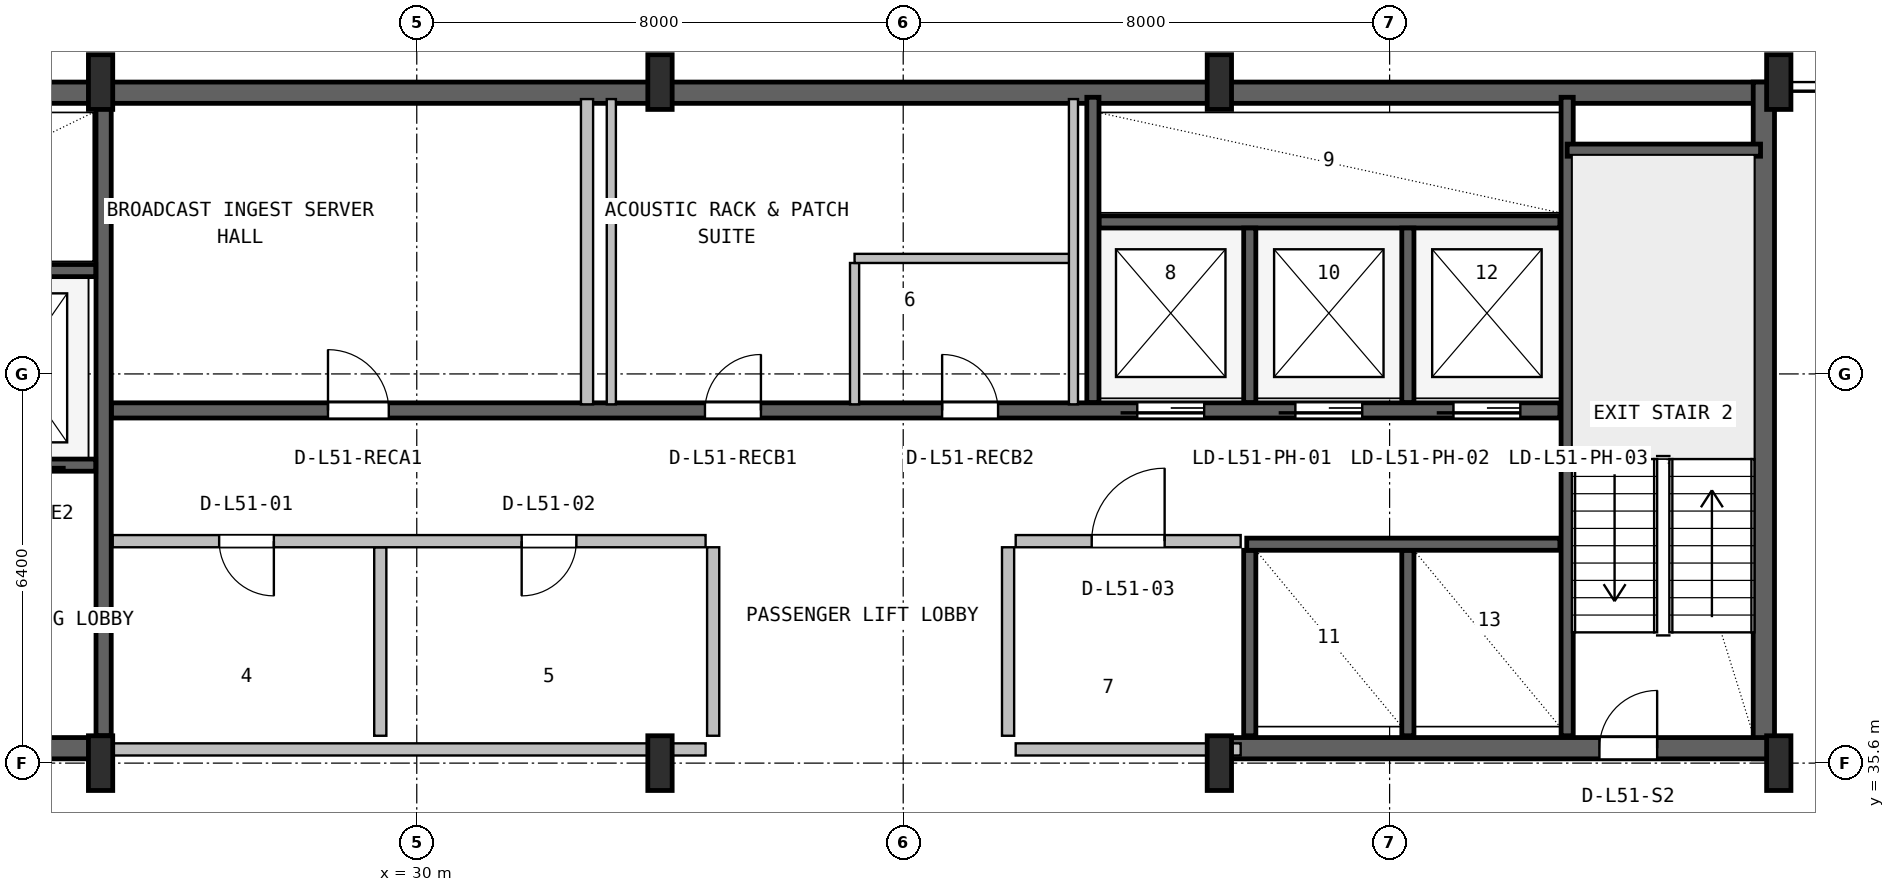
"""IFC4 building model, lengths in metres.
Left out: names, types, materials, properties, quantities, classifications, styles, units other than length and angle.
Written with IfcOpenShell. Run it as: python <this file> out.ifc"""

import sys

from ifc_helpers import new_model, si_unit, direction, frame, frame_2d, origin, origin_2d, place, context, subcontext, project, spatial, rectangle, i_section, extrude, source, transform, mapped, element, fill, save


model = new_model("IFC4")
c1 = context("Model", 3, precision=1e-05, world=origin(), true_north=direction((0.0, 1.0)))
c2 = subcontext(c1, "Body", "Model", "MODEL_VIEW")
j1 = project(units=[si_unit("LENGTHUNIT", "METRE"), si_unit("PLANEANGLEUNIT", "RADIAN")], contexts=[c1])
p1 = place(None, origin())
s1 = spatial("IfcSite", under=j1, at=p1, CompositionType="ELEMENT")
p2 = place(p1, origin())
s2 = spatial("IfcBuilding", under=s1, at=p2, CompositionType="ELEMENT")
p3 = place(p2, frame((0.0, 0.0, 207.4)))
s3 = spatial("IfcBuildingStorey", under=s2, at=p3, CompositionType="ELEMENT", Elevation=207.4)
p4 = place(p3, frame((15.6, 46.625, 0.0), z_axis=(0.0, 0.0, 1.0), x_axis=(1.0, 0.0, 0.0)))
e1 = element("IfcWall", 1, at=p4, inside=s3, PredefinedType="SHEAR", context=c2, shape_type="SweptSolid", body=[
    extrude(rectangle(XDim=36.8, YDim=0.35, at=frame_2d((18.4, 0.0))), origin(), (0.0, 0.0, 1.0), 3.55),
])
p5 = place(p3, frame((52.155, 35.67, 0.0), z_axis=(0.0, 0.0, 1.0), x_axis=(0.0, 1.0, 0.0)))
e2 = element("IfcWall", 2, at=p5, inside=s3, PredefinedType="SHEAR", context=c2, shape_type="SweptSolid", body=[
    extrude(rectangle(XDim=11.13, YDim=0.35, at=frame_2d((5.565, 0.0))), origin(), (0.0, 0.0, 1.0), 3.55),
])
p6 = place(p3, frame((15.67, 35.845, 0.0), z_axis=(0.0, 0.0, 1.0), x_axis=(1.0, 0.0, 0.0)))
e3 = element("IfcWall", 3, at=p6, inside=s3, PredefinedType="SHEAR", context=c2, shape_type="SweptSolid", body=[
    extrude(rectangle(XDim=9.13, YDim=0.35, at=frame_2d((4.565, 0.0))), origin(), (0.0, 0.0, 1.0), 3.55),
])
p7 = place(p6, frame((5.4, 0.0, 0.0)))
e4 = element("IfcOpeningElement", 4, at=p7, cuts=e3, PredefinedType="OPENING", context=c2, shape_type="SweptSolid", body=[
    extrude(rectangle(XDim=1.0, YDim=2.1, at=frame_2d((0.5, 1.05))), frame((0.0, 0.185, 0.0), z_axis=(0.0, -1.0, 0.0), x_axis=(1.0, 0.0, 0.0)), (0.0, 0.0, 1.0), 0.37),
])
p8 = place(p3, frame((43.2, 35.845, 0.0), z_axis=(0.0, 0.0, 1.0), x_axis=(1.0, 0.0, 0.0)))
e5 = element("IfcWall", 5, at=p8, inside=s3, PredefinedType="SHEAR", context=c2, shape_type="SweptSolid", body=[
    extrude(rectangle(XDim=9.13, YDim=0.35, at=frame_2d((4.565, 0.0))), origin(), (0.0, 0.0, 1.0), 3.55),
])
p9 = place(p8, frame((6.25, 0.0, 0.0)))
e6 = element("IfcOpeningElement", 6, at=p9, cuts=e5, PredefinedType="OPENING", context=c2, shape_type="SweptSolid", body=[
    extrude(rectangle(XDim=0.95, YDim=2.1, at=frame_2d((0.475, 1.05))), frame((0.0, 0.185, 0.0), z_axis=(0.0, -1.0, 0.0), x_axis=(1.0, 0.0, 0.0)), (0.0, 0.0, 1.0), 0.37),
])
m1 = source(origin(), c2, "Body", "SweptSolid", [
    extrude(i_section(OverallWidth=0.4, OverallDepth=0.9, WebThickness=0.016, FlangeThickness=0.028, FilletRadius=0.016, at=origin_2d()), origin(), (0.0, 0.0, 1.0), 3.8),
])
for number, where, z_axis, x_axis in (
    (7, (24.8, 35.6, 0.0), (0.0, 0.0, 1.0), (1.0, 0.0, 0.0)),
    (8, (24.8, 46.8, 0.0), (0.0, 0.0, 1.0), (1.0, 0.0, 0.0)),
    (9, (34.0, 35.6, 0.0), (0.0, 0.0, 1.0), (1.0, 0.0, 0.0)),
    (10, (34.0, 46.8, 0.0), (0.0, 0.0, 1.0), (1.0, 0.0, 0.0)),
    (11, (43.2, 35.6, 0.0), (0.0, 0.0, 1.0), (1.0, 0.0, 0.0)),
    (12, (43.2, 46.8, 0.0), (0.0, 0.0, 1.0), (1.0, 0.0, 0.0)),
    (13, (52.4, 35.6, 0.0), (0.0, 0.0, 1.0), (1.0, 0.0, 0.0)),
    (14, (52.4, 46.8, 0.0), (0.0, 0.0, 1.0), (1.0, 0.0, 0.0)),
):
    element("IfcColumn", number, at=place(p3, frame(where, z_axis=z_axis, x_axis=x_axis)), inside=s3, PredefinedType="COLUMN", context=c2, shape_type="MappedRepresentation", body=[
        mapped(m1, transform((0.0, 0.0, 0.0), x_axis=(1.0, 0.0, 0.0), y_axis=(0.0, 1.0, 0.0), z_axis=(0.0, 0.0, 1.0), scale=1.0)),
    ])
p10 = place(p3, frame((24.85, 36.05, 0.0), z_axis=(0.0, 0.0, 1.0), x_axis=(0.0, 1.0, 0.0)))
e15 = element("IfcWall", 15, at=p10, inside=s3, PredefinedType="SHEAR", context=c2, shape_type="SweptSolid", body=[
    extrude(rectangle(XDim=10.45, YDim=0.25, at=frame_2d((5.225, 0.0))), origin(), (0.0, 0.0, 1.0), 3.55),
])
p11 = place(p3, frame((19.2, 40.5, 0.0), z_axis=(0.0, 0.0, 1.0), x_axis=(1.0, 0.0, 0.0)))
e16 = element("IfcWall", 16, at=p11, inside=s3, PredefinedType="SHEAR", context=c2, shape_type="SweptSolid", body=[
    extrude(rectangle(XDim=5.52, YDim=0.2, at=frame_2d((2.76, 0.0))), origin(), (0.0, 0.0, 1.0), 3.55),
])
p12 = place(p11, frame((1.05, 0.0, 0.0)))
e17 = element("IfcOpeningElement", 17, at=p12, cuts=e16, PredefinedType="OPENING", context=c2, shape_type="SweptSolid", body=[
    extrude(rectangle(XDim=1.1, YDim=2.18, at=frame_2d((0.55, 1.09))), frame((0.0, 0.11, 0.0), z_axis=(0.0, -1.0, 0.0), x_axis=(1.0, 0.0, 0.0)), (0.0, 0.0, 1.0), 0.22),
])
p13 = place(p11, frame((3.65, 0.0, 0.0)))
e18 = element("IfcOpeningElement", 18, at=p13, cuts=e16, PredefinedType="OPENING", context=c2, shape_type="SweptSolid", body=[
    extrude(rectangle(XDim=1.1, YDim=2.18, at=frame_2d((0.55, 1.09))), frame((0.0, 0.11, 0.0), z_axis=(0.0, -1.0, 0.0), x_axis=(1.0, 0.0, 0.0)), (0.0, 0.0, 1.0), 0.22),
])
p14 = place(p3, frame((19.2, 43.7, 0.0), z_axis=(0.0, 0.0, 1.0), x_axis=(1.0, 0.0, 0.0)))
e19 = element("IfcWall", 19, at=p14, inside=s3, PredefinedType="SHEAR", context=c2, shape_type="SweptSolid", body=[
    extrude(rectangle(XDim=5.52, YDim=0.2, at=frame_2d((2.76, 0.0))), origin(), (0.0, 0.0, 1.0), 3.55),
])
p15 = place(p3, frame((48.92, 36.05, 0.0), z_axis=(0.0, 0.0, 1.0), x_axis=(0.0, 1.0, 0.0)))
e20 = element("IfcWall", 20, at=p15, inside=s3, PredefinedType="SHEAR", context=c2, shape_type="SweptSolid", body=[
    extrude(rectangle(XDim=10.5, YDim=0.2, at=frame_2d((5.25, 0.0))), origin(), (0.0, 0.0, 1.0), 3.55),
])
p16 = place(p3, frame((48.92, 45.68, 0.0), z_axis=(0.0, 0.0, 1.0), x_axis=(1.0, 0.0, 0.0)))
e21 = element("IfcWall", 21, at=p16, inside=s3, PredefinedType="SHEAR", context=c2, shape_type="SweptSolid", body=[
    extrude(rectangle(XDim=3.18, YDim=0.2, at=frame_2d((1.59, 0.0))), origin(), (0.0, 0.0, 1.0), 3.55),
])
p17 = place(p3, frame((24.98, 41.4, 0.0), z_axis=(0.0, 0.0, 1.0), x_axis=(1.0, 0.0, 0.0)))
e22 = element("IfcWall", 22, at=p17, inside=s3, PredefinedType="SHEAR", context=c2, shape_type="SweptSolid", body=[
    extrude(rectangle(XDim=23.82, YDim=0.25, at=frame_2d((11.91, 0.0))), origin(), (0.0, 0.0, 1.0), 3.55),
])
p18 = place(p17, frame((16.87, 0.0, 0.0)))
e23 = element("IfcOpeningElement", 23, at=p18, cuts=e22, PredefinedType="OPENING", context=c2, shape_type="SweptSolid", body=[
    extrude(rectangle(XDim=1.1, YDim=2.18, at=frame_2d((0.55, 1.09))), frame((0.0, 0.135, 0.0), z_axis=(0.0, -1.0, 0.0), x_axis=(1.0, 0.0, 0.0)), (0.0, 0.0, 1.0), 0.27),
])
p19 = place(p17, frame((19.47, 0.0, 0.0)))
e24 = element("IfcOpeningElement", 24, at=p19, cuts=e22, PredefinedType="OPENING", context=c2, shape_type="SweptSolid", body=[
    extrude(rectangle(XDim=1.1, YDim=2.18, at=frame_2d((0.55, 1.09))), frame((0.0, 0.135, 0.0), z_axis=(0.0, -1.0, 0.0), x_axis=(1.0, 0.0, 0.0)), (0.0, 0.0, 1.0), 0.27),
])
p20 = place(p17, frame((22.07, 0.0, 0.0)))
e25 = element("IfcOpeningElement", 25, at=p20, cuts=e22, PredefinedType="OPENING", context=c2, shape_type="SweptSolid", body=[
    extrude(rectangle(XDim=1.1, YDim=2.18, at=frame_2d((0.55, 1.09))), frame((0.0, 0.135, 0.0), z_axis=(0.0, -1.0, 0.0), x_axis=(1.0, 0.0, 0.0)), (0.0, 0.0, 1.0), 0.27),
])
p21 = place(p17, frame((3.56, 0.0, 0.0)))
e26 = element("IfcOpeningElement", 26, at=p21, cuts=e22, PredefinedType="OPENING", context=c2, shape_type="SweptSolid", body=[
    extrude(rectangle(XDim=1.0, YDim=2.08, at=frame_2d((0.5, 1.04))), frame((0.0, 0.135, 0.0), z_axis=(0.0, -1.0, 0.0), x_axis=(1.0, 0.0, 0.0)), (0.0, 0.0, 1.0), 0.27),
])
p22 = place(p17, frame((9.76, 0.0, 0.0)))
e27 = element("IfcOpeningElement", 27, at=p22, cuts=e22, PredefinedType="OPENING", context=c2, shape_type="SweptSolid", body=[
    extrude(rectangle(XDim=0.92, YDim=2.08, at=frame_2d((0.46, 1.04))), frame((0.0, 0.135, 0.0), z_axis=(0.0, -1.0, 0.0), x_axis=(1.0, 0.0, 0.0)), (0.0, 0.0, 1.0), 0.27),
])
p23 = place(p17, frame((13.66, 0.0, 0.0)))
e28 = element("IfcOpeningElement", 28, at=p23, cuts=e22, PredefinedType="OPENING", context=c2, shape_type="SweptSolid", body=[
    extrude(rectangle(XDim=0.92, YDim=2.08, at=frame_2d((0.46, 1.04))), frame((0.0, 0.135, 0.0), z_axis=(0.0, -1.0, 0.0), x_axis=(1.0, 0.0, 0.0)), (0.0, 0.0, 1.0), 0.27),
])
p24 = place(p3, frame((41.22, 44.5, 0.0), z_axis=(0.0, 0.0, 1.0), x_axis=(1.0, 0.0, 0.0)))
e29 = element("IfcWall", 29, at=p24, inside=s3, PredefinedType="SHEAR", context=c2, shape_type="SweptSolid", body=[
    extrude(rectangle(XDim=7.58, YDim=0.2, at=frame_2d((3.79, 0.0))), origin(), (0.0, 0.0, 1.0), 3.55),
])
p25 = place(p3, frame((41.12, 41.53, 0.0), z_axis=(0.0, 0.0, 1.0), x_axis=(0.0, 1.0, 0.0)))
e30 = element("IfcWall", 30, at=p25, inside=s3, PredefinedType="SHEAR", context=c2, shape_type="SweptSolid", body=[
    extrude(rectangle(XDim=5.02, YDim=0.2, at=frame_2d((2.51, 0.0))), origin(), (0.0, 0.0, 1.0), 3.55),
])
for number, where, z_axis, x_axis in (
    (31, (43.7, 41.53, 0.0), (0.0, 0.0, 1.0), (0.0, 1.0, 0.0)),
    (32, (46.3, 41.53, 0.0), (0.0, 0.0, 1.0), (0.0, 1.0, 0.0)),
):
    element("IfcWall", number, at=place(p3, frame(where, z_axis=z_axis, x_axis=x_axis)), inside=s3, PredefinedType="SHEAR", context=c2, shape_type="SweptSolid", body=[
        extrude(rectangle(XDim=2.87, YDim=0.2, at=frame_2d((1.435, 0.0))), origin(), (0.0, 0.0, 1.0), 3.55),
    ])
for number, where, z_axis, x_axis in (
    (33, (43.7, 36.05, 0.0), (0.0, 0.0, 1.0), (0.0, 1.0, 0.0)),
    (34, (46.3, 36.05, 0.0), (0.0, 0.0, 1.0), (0.0, 1.0, 0.0)),
):
    element("IfcWall", number, at=place(p3, frame(where, z_axis=z_axis, x_axis=x_axis)), inside=s3, PredefinedType="SHEAR", context=c2, shape_type="SweptSolid", body=[
        extrude(rectangle(XDim=3.05, YDim=0.2, at=frame_2d((1.525, 0.0))), origin(), (0.0, 0.0, 1.0), 3.55),
    ])
p26 = place(p3, frame((43.65, 39.2, 0.0), z_axis=(0.0, 0.0, 1.0), x_axis=(1.0, 0.0, 0.0)))
e35 = element("IfcWall", 35, at=p26, inside=s3, PredefinedType="SHEAR", context=c2, shape_type="SweptSolid", body=[
    extrude(rectangle(XDim=5.15, YDim=0.2, at=frame_2d((2.575, 0.0))), origin(), (0.0, 0.0, 1.0), 3.55),
])
p27 = place(p3, frame((25.0, 35.825, 0.0), z_axis=(0.0, 0.0, 1.0), x_axis=(1.0, 0.0, 0.0)))
e36 = element("IfcWall", 36, at=p27, inside=s3, PredefinedType="PLUMBINGWALL", context=c2, shape_type="SweptSolid", body=[
    extrude(rectangle(XDim=9.75, YDim=0.2, at=frame_2d((4.875, 0.0))), origin(), (0.0, 0.0, 1.0), 2.575),
])
p28 = place(p3, frame((29.4, 36.05, 0.0), z_axis=(0.0, 0.0, 1.0), x_axis=(0.0, 1.0, 0.0)))
e37 = element("IfcWall", 37, at=p28, inside=s3, PredefinedType="PLUMBINGWALL", context=c2, shape_type="SweptSolid", body=[
    extrude(rectangle(XDim=3.1, YDim=0.2, at=frame_2d((1.55, 0.0))), origin(), (0.0, 0.0, 1.0), 3.53),
])
p29 = place(p3, frame((25.0, 39.25, 0.0), z_axis=(0.0, 0.0, 1.0), x_axis=(1.0, 0.0, 0.0)))
e38 = element("IfcWall", 38, at=p29, inside=s3, PredefinedType="PLUMBINGWALL", context=c2, shape_type="SweptSolid", body=[
    extrude(rectangle(XDim=9.75, YDim=0.2, at=frame_2d((4.875, 0.0))), origin(), (0.0, 0.0, 1.0), 3.53),
])
p30 = place(p29, frame((1.75, 0.0, 0.0)))
e39 = element("IfcOpeningElement", 39, at=p30, cuts=e38, PredefinedType="OPENING", context=c2, shape_type="SweptSolid", body=[
    extrude(rectangle(XDim=0.9, YDim=2.06, at=frame_2d((0.45, 1.03))), frame((0.0, 0.11, 0.0), z_axis=(0.0, -1.0, 0.0), x_axis=(1.0, 0.0, 0.0)), (0.0, 0.0, 1.0), 0.22),
])
p31 = place(p29, frame((6.725, 0.0, 0.0)))
e40 = element("IfcOpeningElement", 40, at=p31, cuts=e38, PredefinedType="OPENING", context=c2, shape_type="SweptSolid", body=[
    extrude(rectangle(XDim=0.9, YDim=2.06, at=frame_2d((0.45, 1.03))), frame((0.0, 0.11, 0.0), z_axis=(0.0, -1.0, 0.0), x_axis=(1.0, 0.0, 0.0)), (0.0, 0.0, 1.0), 0.22),
])
p32 = place(p3, frame((34.875, 36.05, 0.0), z_axis=(0.0, 0.0, 1.0), x_axis=(0.0, 1.0, 0.0)))
e41 = element("IfcWall", 41, at=p32, inside=s3, PredefinedType="PLUMBINGWALL", context=c2, shape_type="SweptSolid", body=[
    extrude(rectangle(XDim=3.1, YDim=0.2, at=frame_2d((1.55, 0.0))), origin(), (0.0, 0.0, 1.0), 3.53),
])
p33 = place(p3, frame((39.85, 35.825, 0.0), z_axis=(0.0, 0.0, 1.0), x_axis=(1.0, 0.0, 0.0)))
e42 = element("IfcWall", 42, at=p33, inside=s3, PredefinedType="SOLIDWALL", context=c2, shape_type="SweptSolid", body=[
    extrude(rectangle(XDim=3.7, YDim=0.2, at=frame_2d((1.85, 0.0))), origin(), (0.0, 0.0, 1.0), 2.575),
])
p34 = place(p3, frame((39.85, 39.25, 0.0), z_axis=(0.0, 0.0, 1.0), x_axis=(1.0, 0.0, 0.0)))
e43 = element("IfcWall", 43, at=p34, inside=s3, PredefinedType="SOLIDWALL", context=c2, shape_type="SweptSolid", body=[
    extrude(rectangle(XDim=3.7, YDim=0.2, at=frame_2d((1.85, 0.0))), origin(), (0.0, 0.0, 1.0), 3.53),
])
p35 = place(p34, frame((1.25, 0.0, 0.0)))
e44 = element("IfcOpeningElement", 44, at=p35, cuts=e43, PredefinedType="OPENING", context=c2, shape_type="SweptSolid", body=[
    extrude(rectangle(XDim=1.2, YDim=2.1, at=frame_2d((0.6, 1.05))), frame((0.0, 0.11, 0.0), z_axis=(0.0, -1.0, 0.0), x_axis=(1.0, 0.0, 0.0)), (0.0, 0.0, 1.0), 0.22),
])
p36 = place(p3, frame((39.725, 36.05, 0.0), z_axis=(0.0, 0.0, 1.0), x_axis=(0.0, 1.0, 0.0)))
e45 = element("IfcWall", 45, at=p36, inside=s3, PredefinedType="SOLIDWALL", context=c2, shape_type="SweptSolid", body=[
    extrude(rectangle(XDim=3.1, YDim=0.2, at=frame_2d((1.55, 0.0))), origin(), (0.0, 0.0, 1.0), 3.53),
])
p37 = place(p3, frame((32.8, 41.5, 0.0), z_axis=(0.0, 0.0, 1.0), x_axis=(0.0, 1.0, 0.0)))
e46 = element("IfcWall", 46, at=p37, inside=s3, PredefinedType="SOLIDWALL", context=c2, shape_type="SweptSolid", body=[
    extrude(rectangle(XDim=5.02, YDim=0.2, at=frame_2d((2.51, 0.0))), origin(), (0.0, 0.0, 1.0), 3.53),
])
p38 = place(p3, frame((37.2, 41.5, 0.0), z_axis=(0.0, 0.0, 1.0), x_axis=(0.0, 1.0, 0.0)))
e47 = element("IfcWall", 47, at=p38, inside=s3, PredefinedType="PARTITIONING", context=c2, shape_type="SweptSolid", body=[
    extrude(rectangle(XDim=2.325, YDim=0.15, at=frame_2d((1.163, 0.0))), origin(), (0.0, 0.0, 1.0), 3.53),
])
p39 = place(p3, frame((37.2, 43.9, 0.0), z_axis=(0.0, 0.0, 1.0), x_axis=(1.0, 0.0, 0.0)))
e48 = element("IfcWall", 48, at=p39, inside=s3, PredefinedType="PARTITIONING", context=c2, shape_type="SweptSolid", body=[
    extrude(rectangle(XDim=3.6, YDim=0.15, at=frame_2d((1.8, 0.0))), origin(), (0.0, 0.0, 1.0), 3.53),
])
for number, where, z_axis, x_axis in (
    (49, (40.8, 41.5, 0.0), (0.0, 0.0, 1.0), (0.0, 1.0, 0.0)),
    (50, (33.2, 41.5, 0.0), (0.0, 0.0, 1.0), (0.0, 1.0, 0.0)),
):
    element("IfcWall", number, at=place(p3, frame(where, z_axis=z_axis, x_axis=x_axis)), inside=s3, PredefinedType="PARTITIONING", context=c2, shape_type="SweptSolid", body=[
        extrude(rectangle(XDim=5.02, YDim=0.15, at=frame_2d((2.51, 0.0))), origin(), (0.0, 0.0, 1.0), 3.53),
    ])
m2 = source(origin(), c2, "Body", "SweptSolid", [
    extrude(rectangle(XDim=0.95, YDim=2.1, at=frame_2d((0.475, 1.05))), frame((0.0, 0.025, 0.0), z_axis=(0.0, -1.0, 0.0), x_axis=(1.0, 0.0, 0.0)), (0.0, 0.0, 1.0), 0.05),
])
p40 = place(p9, origin())
e51 = element("IfcDoor", 51, at=p40, inside=s3, OperationType="SINGLE_SWING_RIGHT", PredefinedType="DOOR", context=c2, shape_type="MappedRepresentation", body=[
    mapped(m2, transform((0.0, 0.0, 0.0), x_axis=(1.0, 0.0, 0.0), y_axis=(0.0, 1.0, 0.0), z_axis=(0.0, 0.0, 1.0), scale=1.0)),
])
fill(e6, e51)
m3 = source(origin(), c2, "Body", "SweptSolid", [
    extrude(rectangle(XDim=1.1, YDim=2.18, at=frame_2d((0.55, 1.09))), frame((0.0, 0.025, 0.0), z_axis=(0.0, -1.0, 0.0), x_axis=(1.0, 0.0, 0.0)), (0.0, 0.0, 1.0), 0.05),
])
p41 = place(p18, frame((1.1, 0.0, 0.0), z_axis=(0.0, 0.0, 1.0), x_axis=(-1.0, 0.0, 0.0)))
e52 = element("IfcDoor", 52, at=p41, inside=s3, OperationType="SLIDING_TO_LEFT", PredefinedType="DOOR", context=c2, shape_type="MappedRepresentation", body=[
    mapped(m3, transform((0.0, 0.0, 0.0), x_axis=(1.0, 0.0, 0.0), y_axis=(0.0, 1.0, 0.0), z_axis=(0.0, 0.0, 1.0), scale=1.0)),
])
fill(e23, e52)
p42 = place(p19, frame((1.1, 0.0, 0.0), z_axis=(0.0, 0.0, 1.0), x_axis=(-1.0, 0.0, 0.0)))
e53 = element("IfcDoor", 53, at=p42, inside=s3, OperationType="SLIDING_TO_LEFT", PredefinedType="DOOR", context=c2, shape_type="MappedRepresentation", body=[
    mapped(m3, transform((0.0, 0.0, 0.0), x_axis=(1.0, 0.0, 0.0), y_axis=(0.0, 1.0, 0.0), z_axis=(0.0, 0.0, 1.0), scale=1.0)),
])
fill(e24, e53)
p43 = place(p20, frame((1.1, 0.0, 0.0), z_axis=(0.0, 0.0, 1.0), x_axis=(-1.0, 0.0, 0.0)))
e54 = element("IfcDoor", 54, at=p43, inside=s3, OperationType="SLIDING_TO_LEFT", PredefinedType="DOOR", context=c2, shape_type="MappedRepresentation", body=[
    mapped(m3, transform((0.0, 0.0, 0.0), x_axis=(1.0, 0.0, 0.0), y_axis=(0.0, 1.0, 0.0), z_axis=(0.0, 0.0, 1.0), scale=1.0)),
])
fill(e25, e54)
m4 = source(origin(), c2, "Body", "SweptSolid", [
    extrude(rectangle(XDim=1.0, YDim=2.08, at=frame_2d((0.5, 1.04))), frame((0.0, 0.025, 0.0), z_axis=(0.0, -1.0, 0.0), x_axis=(1.0, 0.0, 0.0)), (0.0, 0.0, 1.0), 0.05),
])
p44 = place(p21, origin())
e55 = element("IfcDoor", 55, at=p44, inside=s3, OperationType="SINGLE_SWING_LEFT", PredefinedType="DOOR", context=c2, shape_type="MappedRepresentation", body=[
    mapped(m4, transform((0.0, 0.0, 0.0), x_axis=(1.0, 0.0, 0.0), y_axis=(0.0, 1.0, 0.0), z_axis=(0.0, 0.0, 1.0), scale=1.0)),
])
fill(e26, e55)
m5 = source(origin(), c2, "Body", "SweptSolid", [
    extrude(rectangle(XDim=0.92, YDim=2.08, at=frame_2d((0.46, 1.04))), frame((0.0, 0.025, 0.0), z_axis=(0.0, -1.0, 0.0), x_axis=(1.0, 0.0, 0.0)), (0.0, 0.0, 1.0), 0.05),
])
p45 = place(p22, origin())
e56 = element("IfcDoor", 56, at=p45, inside=s3, OperationType="SINGLE_SWING_RIGHT", PredefinedType="DOOR", context=c2, shape_type="MappedRepresentation", body=[
    mapped(m5, transform((0.0, 0.0, 0.0), x_axis=(1.0, 0.0, 0.0), y_axis=(0.0, 1.0, 0.0), z_axis=(0.0, 0.0, 1.0), scale=1.0)),
])
fill(e27, e56)
p46 = place(p23, origin())
e57 = element("IfcDoor", 57, at=p46, inside=s3, OperationType="SINGLE_SWING_LEFT", PredefinedType="DOOR", context=c2, shape_type="MappedRepresentation", body=[
    mapped(m5, transform((0.0, 0.0, 0.0), x_axis=(1.0, 0.0, 0.0), y_axis=(0.0, 1.0, 0.0), z_axis=(0.0, 0.0, 1.0), scale=1.0)),
])
fill(e28, e57)
m6 = source(origin(), c2, "Body", "SweptSolid", [
    extrude(rectangle(XDim=0.9, YDim=2.06, at=frame_2d((0.45, 1.03))), frame((0.0, 0.025, 0.0), z_axis=(0.0, -1.0, 0.0), x_axis=(1.0, 0.0, 0.0)), (0.0, 0.0, 1.0), 0.05),
])
p47 = place(p30, frame((0.9, 0.0, 0.0), z_axis=(0.0, 0.0, 1.0), x_axis=(-1.0, 0.0, 0.0)))
e58 = element("IfcDoor", 58, at=p47, inside=s3, OperationType="SINGLE_SWING_RIGHT", PredefinedType="DOOR", context=c2, shape_type="MappedRepresentation", body=[
    mapped(m6, transform((0.0, 0.0, 0.0), x_axis=(1.0, 0.0, 0.0), y_axis=(0.0, 1.0, 0.0), z_axis=(0.0, 0.0, 1.0), scale=1.0)),
])
fill(e39, e58)
p48 = place(p31, frame((0.9, 0.0, 0.0), z_axis=(0.0, 0.0, 1.0), x_axis=(-1.0, 0.0, 0.0)))
e59 = element("IfcDoor", 59, at=p48, inside=s3, OperationType="SINGLE_SWING_LEFT", PredefinedType="DOOR", context=c2, shape_type="MappedRepresentation", body=[
    mapped(m6, transform((0.0, 0.0, 0.0), x_axis=(1.0, 0.0, 0.0), y_axis=(0.0, 1.0, 0.0), z_axis=(0.0, 0.0, 1.0), scale=1.0)),
])
fill(e40, e59)
m7 = source(origin(), c2, "Body", "SweptSolid", [
    extrude(rectangle(XDim=1.2, YDim=2.1, at=frame_2d((0.6, 1.05))), frame((0.0, 0.025, 0.0), z_axis=(0.0, -1.0, 0.0), x_axis=(1.0, 0.0, 0.0)), (0.0, 0.0, 1.0), 0.05),
])
p49 = place(p35, origin())
e60 = element("IfcDoor", 60, at=p49, inside=s3, OperationType="SINGLE_SWING_RIGHT", PredefinedType="DOOR", context=c2, shape_type="MappedRepresentation", body=[
    mapped(m7, transform((0.0, 0.0, 0.0), x_axis=(1.0, 0.0, 0.0), y_axis=(0.0, 1.0, 0.0), z_axis=(0.0, 0.0, 1.0), scale=1.0)),
])
fill(e44, e60)
save(model, sys.argv[1])
